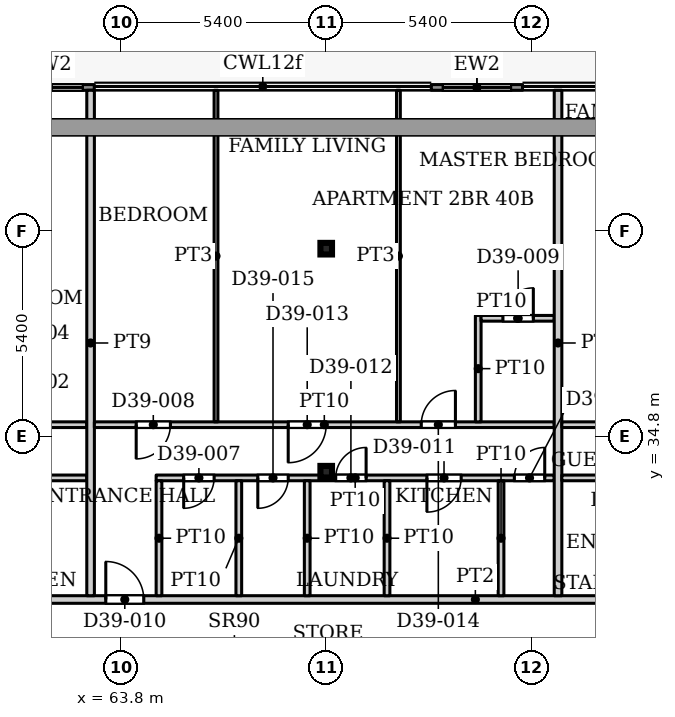
"""IFC4 building model, lengths in metres.
Left out: names, types, materials, properties, quantities, classifications, styles, units other than length and angle.
Written with IfcOpenShell. Run it as: python <this file> out.ifc"""

import sys

from ifc_helpers import new_model, si_unit, direction, frame, frame_2d, origin, origin_2d, place, context, subcontext, project, spatial, rectangle, hollow_rectangle, extrude, source, transform, mapped, element, fill, save


model = new_model("IFC4")
c1 = context("Model", 3, precision=1e-05, world=origin(), true_north=direction((0.0, 1.0)))
c2 = subcontext(c1, "Body", "Model", "MODEL_VIEW")
j1 = project(units=[si_unit("LENGTHUNIT", "METRE"), si_unit("PLANEANGLEUNIT", "RADIAN")], contexts=[c1])
p1 = place(None, origin())
s1 = spatial("IfcSite", under=j1, at=p1, CompositionType="ELEMENT")
p2 = place(p1, origin())
s2 = spatial("IfcBuilding", under=s1, at=p2, CompositionType="ELEMENT")
p3 = place(p2, frame((0.0, 0.0, 172.1)))
s3 = spatial("IfcBuildingStorey", under=s2, at=p3, CompositionType="ELEMENT", Elevation=172.1)
for number, where, z_axis, x_axis in (
    (1, (69.2, 33.863, 0.0), (0.0, 0.0, 1.0), (1.0, 0.0, 0.0)),
    (2, (69.2, 39.732, 0.0), (0.0, 0.0, 1.0), (1.0, 0.0, 0.0)),
):
    element("IfcColumn", number, at=place(p3, frame(where, z_axis=z_axis, x_axis=x_axis)), inside=s3, PredefinedType="COLUMN", context=c2, shape_type="SweptSolid", body=[
        extrude(hollow_rectangle(XDim=0.305, YDim=0.305, WallThickness=0.016, InnerFilletRadius=0.016, OuterFilletRadius=0.032, at=origin_2d()), origin(), (0.0, 0.0, 1.0), 3.9),
    ])
p4 = place(p3, frame((60.697, 43.975, 0.0), z_axis=(0.0, 0.0, 1.0), x_axis=(1.0, 0.0, 0.0)))
e3 = element("IfcWall", 3, at=p4, inside=s3, PredefinedType="SOLIDWALL", context=c2, shape_type="SweptSolid", body=[
    extrude(rectangle(XDim=2.4, YDim=0.15, at=frame_2d((1.2, 0.0))), origin(), (0.0, 0.0, 1.0), 3.75),
])
p5 = place(p4, frame((0.3, 0.0, 0.0)))
e4 = element("IfcOpeningElement", 4, at=p5, cuts=e3, PredefinedType="OPENING", context=c2, shape_type="SweptSolid", body=[
    extrude(rectangle(XDim=1.8, YDim=2.4, at=frame_2d((0.9, 1.2))), frame((0.0, 0.085, 0.0), z_axis=(0.0, -1.0, 0.0), x_axis=(1.0, 0.0, 0.0)), (0.0, 0.0, 1.0), 0.17),
])
p6 = place(p3, frame((71.965, 43.975, 0.0), z_axis=(0.0, 0.0, 1.0), x_axis=(1.0, 0.0, 0.0)))
e5 = element("IfcWall", 5, at=p6, inside=s3, PredefinedType="SOLIDWALL", context=c2, shape_type="SweptSolid", body=[
    extrude(rectangle(XDim=2.4, YDim=0.15, at=frame_2d((1.2, 0.0))), origin(), (0.0, 0.0, 1.0), 3.75),
])
p7 = place(p6, frame((0.3, 0.0, 0.0)))
e6 = element("IfcOpeningElement", 6, at=p7, cuts=e5, PredefinedType="OPENING", context=c2, shape_type="SweptSolid", body=[
    extrude(rectangle(XDim=1.8, YDim=2.4, at=frame_2d((0.9, 1.2))), frame((0.0, 0.085, 0.0), z_axis=(0.0, -1.0, 0.0), x_axis=(1.0, 0.0, 0.0)), (0.0, 0.0, 1.0), 0.17),
])
p8 = place(p3, frame((53.549, 30.5, 0.0), z_axis=(0.0, 0.0, 1.0), x_axis=(1.0, 0.0, 0.0)))
e7 = element("IfcWall", 7, at=p8, inside=s3, PredefinedType="PARTITIONING", context=c2, shape_type="SweptSolid", body=[
    extrude(rectangle(XDim=39.151, YDim=0.2, at=frame_2d((19.575, 0.0))), origin(), (0.0, 0.0, 1.0), 3.6),
])
p9 = place(p8, frame((2.801, 0.0, 0.0)))
e8 = element("IfcOpeningElement", 8, at=p9, cuts=e7, PredefinedType="OPENING", context=c2, shape_type="SweptSolid", body=[
    extrude(rectangle(XDim=1.0, YDim=2.1, at=frame_2d((0.5, 1.05))), frame((0.0, 0.11, 0.0), z_axis=(0.0, -1.0, 0.0), x_axis=(1.0, 0.0, 0.0)), (0.0, 0.0, 1.0), 0.22),
])
p10 = place(p8, frame((9.851, 0.0, 0.0)))
e9 = element("IfcOpeningElement", 9, at=p10, cuts=e7, PredefinedType="OPENING", context=c2, shape_type="SweptSolid", body=[
    extrude(rectangle(XDim=1.0, YDim=2.1, at=frame_2d((0.5, 1.05))), frame((0.0, 0.11, 0.0), z_axis=(0.0, -1.0, 0.0), x_axis=(1.0, 0.0, 0.0)), (0.0, 0.0, 1.0), 0.22),
])
p11 = place(p8, frame((28.751, 0.0, 0.0)))
e10 = element("IfcOpeningElement", 10, at=p11, cuts=e7, PredefinedType="OPENING", context=c2, shape_type="SweptSolid", body=[
    extrude(rectangle(XDim=1.0, YDim=2.1, at=frame_2d((0.5, 1.05))), frame((0.0, 0.11, 0.0), z_axis=(0.0, -1.0, 0.0), x_axis=(1.0, 0.0, 0.0)), (0.0, 0.0, 1.0), 0.22),
])
p12 = place(p8, frame((32.651, 0.0, 0.0)))
e11 = element("IfcOpeningElement", 11, at=p12, cuts=e7, PredefinedType="OPENING", context=c2, shape_type="SweptSolid", body=[
    extrude(rectangle(XDim=1.0, YDim=2.1, at=frame_2d((0.5, 1.05))), frame((0.0, 0.11, 0.0), z_axis=(0.0, -1.0, 0.0), x_axis=(1.0, 0.0, 0.0)), (0.0, 0.0, 1.0), 0.22),
])
p13 = place(p3, frame((53.549, 35.1, 0.0), z_axis=(0.0, 0.0, 1.0), x_axis=(1.0, 0.0, 0.0)))
e12 = element("IfcWall", 12, at=p13, inside=s3, PredefinedType="PARTITIONING", context=c2, shape_type="SweptSolid", body=[
    extrude(rectangle(XDim=9.351, YDim=0.15, at=frame_2d((4.675, 0.0))), origin(), (0.0, 0.0, 1.0), 3.6),
])
p14 = place(p13, frame((7.351, 0.0, 0.0)))
e13 = element("IfcOpeningElement", 13, at=p14, cuts=e12, PredefinedType="OPENING", context=c2, shape_type="SweptSolid", body=[
    extrude(rectangle(XDim=0.9, YDim=2.1, at=frame_2d((0.45, 1.05))), frame((0.0, 0.085, 0.0), z_axis=(0.0, -1.0, 0.0), x_axis=(1.0, 0.0, 0.0)), (0.0, 0.0, 1.0), 0.17),
])
p15 = place(p13, frame((2.501, 0.0, 0.0)))
e14 = element("IfcOpeningElement", 14, at=p15, cuts=e12, PredefinedType="OPENING", context=c2, shape_type="SweptSolid", body=[
    extrude(rectangle(XDim=1.0, YDim=2.1, at=frame_2d((0.5, 1.05))), frame((0.0, 0.085, 0.0), z_axis=(0.0, -1.0, 0.0), x_axis=(1.0, 0.0, 0.0)), (0.0, 0.0, 1.0), 0.17),
])
p16 = place(p3, frame((57.825, 33.7, 0.0), z_axis=(0.0, 0.0, 1.0), x_axis=(1.0, 0.0, 0.0)))
e15 = element("IfcWall", 15, at=p16, inside=s3, PredefinedType="PARTITIONING", context=c2, shape_type="SweptSolid", body=[
    extrude(rectangle(XDim=5.075, YDim=0.15, at=frame_2d((2.538, 0.0))), origin(), (0.0, 0.0, 1.0), 3.6),
])
p17 = place(p16, frame((3.075, 0.0, 0.0)))
e16 = element("IfcOpeningElement", 16, at=p17, cuts=e15, PredefinedType="OPENING", context=c2, shape_type="SweptSolid", body=[
    extrude(rectangle(XDim=0.9, YDim=2.1, at=frame_2d((0.45, 1.05))), frame((0.0, 0.085, 0.0), z_axis=(0.0, -1.0, 0.0), x_axis=(1.0, 0.0, 0.0)), (0.0, 0.0, 1.0), 0.17),
])
p18 = place(p16, frame((0.575, 0.0, 0.0)))
e17 = element("IfcOpeningElement", 17, at=p18, cuts=e15, PredefinedType="OPENING", context=c2, shape_type="SweptSolid", body=[
    extrude(rectangle(XDim=0.8, YDim=2.1, at=frame_2d((0.4, 1.05))), frame((0.0, 0.085, 0.0), z_axis=(0.0, -1.0, 0.0), x_axis=(1.0, 0.0, 0.0)), (0.0, 0.0, 1.0), 0.17),
])
p19 = place(p3, frame((63.0, 30.6, 0.0), z_axis=(0.0, 0.0, 1.0), x_axis=(0.0, 1.0, 0.0)))
e18 = element("IfcWall", 18, at=p19, inside=s3, PredefinedType="PARTITIONING", context=c2, shape_type="SweptSolid", body=[
    extrude(rectangle(XDim=13.3, YDim=0.2, at=frame_2d((6.65, 0.0))), origin(), (0.0, 0.0, 1.0), 3.6),
])
p20 = place(p3, frame((63.1, 35.1, 0.0), z_axis=(0.0, 0.0, 1.0), x_axis=(1.0, 0.0, 0.0)))
e19 = element("IfcWall", 19, at=p20, inside=s3, PredefinedType="PARTITIONING", context=c2, shape_type="SweptSolid", body=[
    extrude(rectangle(XDim=12.1, YDim=0.15, at=frame_2d((6.05, 0.0))), origin(), (0.0, 0.0, 1.0), 3.6),
])
p21 = place(p20, frame((1.1, 0.0, 0.0)))
e20 = element("IfcOpeningElement", 20, at=p21, cuts=e19, PredefinedType="OPENING", context=c2, shape_type="SweptSolid", body=[
    extrude(rectangle(XDim=0.9, YDim=2.1, at=frame_2d((0.45, 1.05))), frame((0.0, 0.085, 0.0), z_axis=(0.0, -1.0, 0.0), x_axis=(1.0, 0.0, 0.0)), (0.0, 0.0, 1.0), 0.17),
])
p22 = place(p20, frame((5.1, 0.0, 0.0)))
e21 = element("IfcOpeningElement", 21, at=p22, cuts=e19, PredefinedType="OPENING", context=c2, shape_type="SweptSolid", body=[
    extrude(rectangle(XDim=1.0, YDim=2.1, at=frame_2d((0.5, 1.05))), frame((0.0, 0.085, 0.0), z_axis=(0.0, -1.0, 0.0), x_axis=(1.0, 0.0, 0.0)), (0.0, 0.0, 1.0), 0.17),
])
p23 = place(p20, frame((8.6, 0.0, 0.0)))
e22 = element("IfcOpeningElement", 22, at=p23, cuts=e19, PredefinedType="OPENING", context=c2, shape_type="SweptSolid", body=[
    extrude(rectangle(XDim=0.9, YDim=2.1, at=frame_2d((0.45, 1.05))), frame((0.0, 0.085, 0.0), z_axis=(0.0, -1.0, 0.0), x_axis=(1.0, 0.0, 0.0)), (0.0, 0.0, 1.0), 0.17),
])
p24 = place(p3, frame((64.725, 33.7, 0.0), z_axis=(0.0, 0.0, 1.0), x_axis=(1.0, 0.0, 0.0)))
e23 = element("IfcWall", 23, at=p24, inside=s3, PredefinedType="PARTITIONING", context=c2, shape_type="SweptSolid", body=[
    extrude(rectangle(XDim=10.475, YDim=0.15, at=frame_2d((5.237, 0.0))), origin(), (0.0, 0.0, 1.0), 3.6),
])
p25 = place(p24, frame((0.725, 0.0, 0.0)))
e24 = element("IfcOpeningElement", 24, at=p25, cuts=e23, PredefinedType="OPENING", context=c2, shape_type="SweptSolid", body=[
    extrude(rectangle(XDim=0.8, YDim=2.1, at=frame_2d((0.4, 1.05))), frame((0.0, 0.085, 0.0), z_axis=(0.0, -1.0, 0.0), x_axis=(1.0, 0.0, 0.0)), (0.0, 0.0, 1.0), 0.17),
])
p26 = place(p24, frame((7.125, 0.0, 0.0)))
e25 = element("IfcOpeningElement", 25, at=p26, cuts=e23, PredefinedType="OPENING", context=c2, shape_type="SweptSolid", body=[
    extrude(rectangle(XDim=0.9, YDim=2.1, at=frame_2d((0.45, 1.05))), frame((0.0, 0.085, 0.0), z_axis=(0.0, -1.0, 0.0), x_axis=(1.0, 0.0, 0.0)), (0.0, 0.0, 1.0), 0.17),
])
p27 = place(p24, frame((4.725, 0.0, 0.0)))
e26 = element("IfcOpeningElement", 26, at=p27, cuts=e23, PredefinedType="OPENING", context=c2, shape_type="SweptSolid", body=[
    extrude(rectangle(XDim=0.8, YDim=2.1, at=frame_2d((0.4, 1.05))), frame((0.0, 0.085, 0.0), z_axis=(0.0, -1.0, 0.0), x_axis=(1.0, 0.0, 0.0)), (0.0, 0.0, 1.0), 0.17),
])
p28 = place(p24, frame((2.675, 0.0, 0.0)))
e27 = element("IfcOpeningElement", 27, at=p28, cuts=e23, PredefinedType="OPENING", context=c2, shape_type="SweptSolid", body=[
    extrude(rectangle(XDim=0.8, YDim=2.1, at=frame_2d((0.4, 1.05))), frame((0.0, 0.085, 0.0), z_axis=(0.0, -1.0, 0.0), x_axis=(1.0, 0.0, 0.0)), (0.0, 0.0, 1.0), 0.17),
])
p29 = place(p24, frame((9.425, 0.0, 0.0)))
e28 = element("IfcOpeningElement", 28, at=p29, cuts=e23, PredefinedType="OPENING", context=c2, shape_type="SweptSolid", body=[
    extrude(rectangle(XDim=0.8, YDim=2.1, at=frame_2d((0.4, 1.05))), frame((0.0, 0.085, 0.0), z_axis=(0.0, -1.0, 0.0), x_axis=(1.0, 0.0, 0.0)), (0.0, 0.0, 1.0), 0.17),
])
p30 = place(p3, frame((64.8, 30.6, 0.0), z_axis=(0.0, 0.0, 1.0), x_axis=(0.0, 1.0, 0.0)))
e29 = element("IfcWall", 29, at=p30, inside=s3, PredefinedType="PARTITIONING", context=c2, shape_type="SweptSolid", body=[
    extrude(rectangle(XDim=3.025, YDim=0.15, at=frame_2d((1.512, 0.0))), origin(), (0.0, 0.0, 1.0), 3.6),
])
p31 = place(p3, frame((66.3, 35.175, 0.0), z_axis=(0.0, 0.0, 1.0), x_axis=(0.0, 1.0, 0.0)))
e30 = element("IfcWall", 30, at=p31, inside=s3, PredefinedType="PARTITIONING", context=c2, shape_type="SweptSolid", body=[
    extrude(rectangle(XDim=8.725, YDim=0.1, at=frame_2d((4.362, 0.0))), origin(), (0.0, 0.0, 1.0), 3.6),
])
for number, where, z_axis, x_axis in (
    (31, (66.9, 30.6, 0.0), (0.0, 0.0, 1.0), (0.0, 1.0, 0.0)),
    (32, (68.7, 30.6, 0.0), (0.0, 0.0, 1.0), (0.0, 1.0, 0.0)),
    (33, (70.8, 30.6, 0.0), (0.0, 0.0, 1.0), (0.0, 1.0, 0.0)),
):
    element("IfcWall", number, at=place(p3, frame(where, z_axis=z_axis, x_axis=x_axis)), inside=s3, PredefinedType="PARTITIONING", context=c2, shape_type="SweptSolid", body=[
        extrude(rectangle(XDim=3.025, YDim=0.15, at=frame_2d((1.512, 0.0))), origin(), (0.0, 0.0, 1.0), 3.6),
    ])
p32 = place(p3, frame((71.1, 35.175, 0.0), z_axis=(0.0, 0.0, 1.0), x_axis=(0.0, 1.0, 0.0)))
e34 = element("IfcWall", 34, at=p32, inside=s3, PredefinedType="PARTITIONING", context=c2, shape_type="SweptSolid", body=[
    extrude(rectangle(XDim=8.725, YDim=0.1, at=frame_2d((4.362, 0.0))), origin(), (0.0, 0.0, 1.0), 3.6),
])
p33 = place(p3, frame((73.2, 35.175, 0.0), z_axis=(0.0, 0.0, 1.0), x_axis=(0.0, 1.0, 0.0)))
e35 = element("IfcWall", 35, at=p33, inside=s3, PredefinedType="PARTITIONING", context=c2, shape_type="SweptSolid", body=[
    extrude(rectangle(XDim=2.8, YDim=0.15, at=frame_2d((1.4, 0.0))), origin(), (0.0, 0.0, 1.0), 3.6),
])
p34 = place(p3, frame((73.275, 37.9, 0.0), z_axis=(0.0, 0.0, 1.0), x_axis=(1.0, 0.0, 0.0)))
e36 = element("IfcWall", 36, at=p34, inside=s3, PredefinedType="PARTITIONING", context=c2, shape_type="SweptSolid", body=[
    extrude(rectangle(XDim=1.925, YDim=0.15, at=frame_2d((0.962, 0.0))), origin(), (0.0, 0.0, 1.0), 3.6),
])
p35 = place(p34, frame((0.575, 0.0, 0.0)))
e37 = element("IfcOpeningElement", 37, at=p35, cuts=e36, PredefinedType="OPENING", context=c2, shape_type="SweptSolid", body=[
    extrude(rectangle(XDim=0.8, YDim=2.1, at=frame_2d((0.4, 1.05))), frame((0.0, 0.085, 0.0), z_axis=(0.0, -1.0, 0.0), x_axis=(1.0, 0.0, 0.0)), (0.0, 0.0, 1.0), 0.17),
])
p36 = place(p3, frame((73.8, 30.6, 0.0), z_axis=(0.0, 0.0, 1.0), x_axis=(0.0, 1.0, 0.0)))
e38 = element("IfcWall", 38, at=p36, inside=s3, PredefinedType="PARTITIONING", context=c2, shape_type="SweptSolid", body=[
    extrude(rectangle(XDim=3.025, YDim=0.15, at=frame_2d((1.512, 0.0))), origin(), (0.0, 0.0, 1.0), 3.6),
])
p37 = place(p3, frame((75.3, 30.6, 0.0), z_axis=(0.0, 0.0, 1.0), x_axis=(0.0, 1.0, 0.0)))
e39 = element("IfcWall", 39, at=p37, inside=s3, PredefinedType="PARTITIONING", context=c2, shape_type="SweptSolid", body=[
    extrude(rectangle(XDim=13.3, YDim=0.2, at=frame_2d((6.65, 0.0))), origin(), (0.0, 0.0, 1.0), 3.6),
])
p38 = place(p3, frame((75.4, 33.7, 0.0), z_axis=(0.0, 0.0, 1.0), x_axis=(1.0, 0.0, 0.0)))
e40 = element("IfcWall", 40, at=p38, inside=s3, PredefinedType="PARTITIONING", context=c2, shape_type="SweptSolid", body=[
    extrude(rectangle(XDim=6.275, YDim=0.15, at=frame_2d((3.138, 0.0))), origin(), (0.0, 0.0, 1.0), 3.6),
])
p39 = place(p38, frame((4.6, 0.0, 0.0)))
e41 = element("IfcOpeningElement", 41, at=p39, cuts=e40, PredefinedType="OPENING", context=c2, shape_type="SweptSolid", body=[
    extrude(rectangle(XDim=0.8, YDim=2.1, at=frame_2d((0.4, 1.05))), frame((0.0, 0.085, 0.0), z_axis=(0.0, -1.0, 0.0), x_axis=(1.0, 0.0, 0.0)), (0.0, 0.0, 1.0), 0.17),
])
p40 = place(p38, frame((1.4, 0.0, 0.0)))
e42 = element("IfcOpeningElement", 42, at=p40, cuts=e40, PredefinedType="OPENING", context=c2, shape_type="SweptSolid", body=[
    extrude(rectangle(XDim=0.9, YDim=2.1, at=frame_2d((0.45, 1.05))), frame((0.0, 0.085, 0.0), z_axis=(0.0, -1.0, 0.0), x_axis=(1.0, 0.0, 0.0)), (0.0, 0.0, 1.0), 0.17),
])
p41 = place(p3, frame((75.4, 35.1, 0.0), z_axis=(0.0, 0.0, 1.0), x_axis=(1.0, 0.0, 0.0)))
e43 = element("IfcWall", 43, at=p41, inside=s3, PredefinedType="PARTITIONING", context=c2, shape_type="SweptSolid", body=[
    extrude(rectangle(XDim=10.3, YDim=0.15, at=frame_2d((5.15, 0.0))), origin(), (0.0, 0.0, 1.0), 3.6),
])
p42 = place(p41, frame((5.3, 0.0, 0.0)))
e44 = element("IfcOpeningElement", 44, at=p42, cuts=e43, PredefinedType="OPENING", context=c2, shape_type="SweptSolid", body=[
    extrude(rectangle(XDim=0.9, YDim=2.1, at=frame_2d((0.45, 1.05))), frame((0.0, 0.085, 0.0), z_axis=(0.0, -1.0, 0.0), x_axis=(1.0, 0.0, 0.0)), (0.0, 0.0, 1.0), 0.17),
])
p43 = place(p41, frame((1.65, 0.0, 0.0)))
e45 = element("IfcOpeningElement", 45, at=p43, cuts=e43, PredefinedType="OPENING", context=c2, shape_type="SweptSolid", body=[
    extrude(rectangle(XDim=1.0, YDim=2.1, at=frame_2d((0.5, 1.05))), frame((0.0, 0.085, 0.0), z_axis=(0.0, -1.0, 0.0), x_axis=(1.0, 0.0, 0.0)), (0.0, 0.0, 1.0), 0.17),
])
p44 = place(p41, frame((8.3, 0.0, 0.0)))
e46 = element("IfcOpeningElement", 46, at=p44, cuts=e43, PredefinedType="OPENING", context=c2, shape_type="SweptSolid", body=[
    extrude(rectangle(XDim=0.9, YDim=2.1, at=frame_2d((0.45, 1.05))), frame((0.0, 0.085, 0.0), z_axis=(0.0, -1.0, 0.0), x_axis=(1.0, 0.0, 0.0)), (0.0, 0.0, 1.0), 0.17),
])
m1 = source(origin(), c2, "Body", "SweptSolid", [
    extrude(rectangle(XDim=1.8, YDim=2.4, at=frame_2d((0.9, 1.2))), frame((0.0, 0.025, 0.0), z_axis=(0.0, -1.0, 0.0), x_axis=(1.0, 0.0, 0.0)), (0.0, 0.0, 1.0), 0.05),
])
p45 = place(p5, origin())
e47 = element("IfcDoor", 47, at=p45, inside=s3, OperationType="SLIDING_TO_LEFT", PredefinedType="DOOR", context=c2, shape_type="MappedRepresentation", body=[
    mapped(m1, transform((0.0, 0.0, 0.0), x_axis=(1.0, 0.0, 0.0), y_axis=(0.0, 1.0, 0.0), z_axis=(0.0, 0.0, 1.0), scale=1.0)),
])
fill(e4, e47)
p46 = place(p7, origin())
e48 = element("IfcDoor", 48, at=p46, inside=s3, OperationType="SLIDING_TO_LEFT", PredefinedType="DOOR", context=c2, shape_type="MappedRepresentation", body=[
    mapped(m1, transform((0.0, 0.0, 0.0), x_axis=(1.0, 0.0, 0.0), y_axis=(0.0, 1.0, 0.0), z_axis=(0.0, 0.0, 1.0), scale=1.0)),
])
fill(e6, e48)
m2 = source(origin(), c2, "Body", "SweptSolid", [
    extrude(rectangle(XDim=0.8, YDim=2.1, at=frame_2d((0.4, 1.05))), frame((0.0, 0.025, 0.0), z_axis=(0.0, -1.0, 0.0), x_axis=(1.0, 0.0, 0.0)), (0.0, 0.0, 1.0), 0.05),
])
p47 = place(p25, origin())
e49 = element("IfcDoor", 49, at=p47, inside=s3, OperationType="SINGLE_SWING_RIGHT", PredefinedType="DOOR", context=c2, shape_type="MappedRepresentation", body=[
    mapped(m2, transform((0.0, 0.0, 0.0), x_axis=(1.0, 0.0, 0.0), y_axis=(0.0, 1.0, 0.0), z_axis=(0.0, 0.0, 1.0), scale=1.0)),
])
fill(e24, e49)
m3 = source(origin(), c2, "Body", "SweptSolid", [
    extrude(rectangle(XDim=0.9, YDim=2.1, at=frame_2d((0.45, 1.05))), frame((0.0, 0.025, 0.0), z_axis=(0.0, -1.0, 0.0), x_axis=(1.0, 0.0, 0.0)), (0.0, 0.0, 1.0), 0.05),
])
p48 = place(p21, origin())
e50 = element("IfcDoor", 50, at=p48, inside=s3, OperationType="SINGLE_SWING_RIGHT", PredefinedType="DOOR", context=c2, shape_type="MappedRepresentation", body=[
    mapped(m3, transform((0.0, 0.0, 0.0), x_axis=(1.0, 0.0, 0.0), y_axis=(0.0, 1.0, 0.0), z_axis=(0.0, 0.0, 1.0), scale=1.0)),
])
fill(e20, e50)
p49 = place(p35, origin())
e51 = element("IfcDoor", 51, at=p49, inside=s3, OperationType="SINGLE_SWING_LEFT", PredefinedType="DOOR", context=c2, shape_type="MappedRepresentation", body=[
    mapped(m2, transform((0.0, 0.0, 0.0), x_axis=(1.0, 0.0, 0.0), y_axis=(0.0, 1.0, 0.0), z_axis=(0.0, 0.0, 1.0), scale=1.0)),
])
fill(e37, e51)
m4 = source(origin(), c2, "Body", "SweptSolid", [
    extrude(rectangle(XDim=1.0, YDim=2.1, at=frame_2d((0.5, 1.05))), frame((0.0, 0.025, 0.0), z_axis=(0.0, -1.0, 0.0), x_axis=(1.0, 0.0, 0.0)), (0.0, 0.0, 1.0), 0.05),
])
p50 = place(p10, origin())
e52 = element("IfcDoor", 52, at=p50, inside=s3, OperationType="SINGLE_SWING_LEFT", PredefinedType="DOOR", context=c2, shape_type="MappedRepresentation", body=[
    mapped(m4, transform((0.0, 0.0, 0.0), x_axis=(1.0, 0.0, 0.0), y_axis=(0.0, 1.0, 0.0), z_axis=(0.0, 0.0, 1.0), scale=1.0)),
])
fill(e9, e52)
p51 = place(p26, origin())
e53 = element("IfcDoor", 53, at=p51, inside=s3, OperationType="SINGLE_SWING_RIGHT", PredefinedType="DOOR", context=c2, shape_type="MappedRepresentation", body=[
    mapped(m3, transform((0.0, 0.0, 0.0), x_axis=(1.0, 0.0, 0.0), y_axis=(0.0, 1.0, 0.0), z_axis=(0.0, 0.0, 1.0), scale=1.0)),
])
fill(e25, e53)
p52 = place(p27, origin())
e54 = element("IfcDoor", 54, at=p52, inside=s3, OperationType="SINGLE_SWING_LEFT", PredefinedType="DOOR", context=c2, shape_type="MappedRepresentation", body=[
    mapped(m2, transform((0.0, 0.0, 0.0), x_axis=(1.0, 0.0, 0.0), y_axis=(0.0, 1.0, 0.0), z_axis=(0.0, 0.0, 1.0), scale=1.0)),
])
fill(e26, e54)
m5 = source(origin(), c2, "Body", "SweptSolid", [
    extrude(rectangle(XDim=1.0, YDim=2.1, at=frame_2d((0.5, 1.05))), frame((0.0, 0.025, 0.0), z_axis=(0.0, -1.0, 0.0), x_axis=(1.0, 0.0, 0.0)), (0.0, 0.0, 1.0), 0.05),
])
p53 = place(p22, origin())
e55 = element("IfcDoor", 55, at=p53, inside=s3, OperationType="SINGLE_SWING_RIGHT", PredefinedType="DOOR", context=c2, shape_type="MappedRepresentation", body=[
    mapped(m5, transform((0.0, 0.0, 0.0), x_axis=(1.0, 0.0, 0.0), y_axis=(0.0, 1.0, 0.0), z_axis=(0.0, 0.0, 1.0), scale=1.0)),
])
fill(e21, e55)
p54 = place(p23, origin())
e56 = element("IfcDoor", 56, at=p54, inside=s3, OperationType="SINGLE_SWING_LEFT", PredefinedType="DOOR", context=c2, shape_type="MappedRepresentation", body=[
    mapped(m3, transform((0.0, 0.0, 0.0), x_axis=(1.0, 0.0, 0.0), y_axis=(0.0, 1.0, 0.0), z_axis=(0.0, 0.0, 1.0), scale=1.0)),
])
fill(e22, e56)
p55 = place(p28, origin())
e57 = element("IfcDoor", 57, at=p55, inside=s3, OperationType="SINGLE_SWING_RIGHT", PredefinedType="DOOR", context=c2, shape_type="MappedRepresentation", body=[
    mapped(m2, transform((0.0, 0.0, 0.0), x_axis=(1.0, 0.0, 0.0), y_axis=(0.0, 1.0, 0.0), z_axis=(0.0, 0.0, 1.0), scale=1.0)),
])
fill(e27, e57)
p56 = place(p29, origin())
e58 = element("IfcDoor", 58, at=p56, inside=s3, OperationType="SINGLE_SWING_LEFT", PredefinedType="DOOR", context=c2, shape_type="MappedRepresentation", body=[
    mapped(m2, transform((0.0, 0.0, 0.0), x_axis=(1.0, 0.0, 0.0), y_axis=(0.0, 1.0, 0.0), z_axis=(0.0, 0.0, 1.0), scale=1.0)),
])
fill(e28, e58)
save(model, sys.argv[1])
